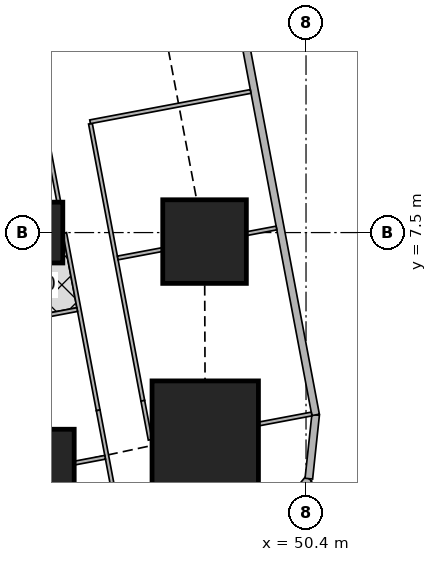
"""IFC4 building model, lengths in metres.
Left out: names, types, materials, properties, quantities, classifications, styles, units other than length and angle.
Written with IfcOpenShell. Run it as: python <this file> out.ifc"""

import sys

from ifc_helpers import new_model, si_unit, direction, frame, frame_2d, origin, origin_2d, place, context, subcontext, project, spatial, rectangle, extrude, element, fill, save


model = new_model("IFC4")
c1 = context("Model", 3, precision=1e-05, world=origin(), true_north=direction((0.0, 1.0)))
c2 = subcontext(c1, "Body", "Model", "MODEL_VIEW")
j1 = project(units=[si_unit("LENGTHUNIT", "METRE"), si_unit("PLANEANGLEUNIT", "RADIAN")], contexts=[c1])
p1 = place(None, origin())
s1 = spatial("IfcSite", under=j1, at=p1, CompositionType="ELEMENT")
p2 = place(p1, origin())
s2 = spatial("IfcBuilding", under=s1, at=p2, CompositionType="ELEMENT")
p3 = place(p2, frame((0.0, 0.0, 100.4)))
s3 = spatial("IfcBuildingStorey", under=s2, at=p3, CompositionType="ELEMENT", Elevation=100.4)
p4 = place(p3, frame((43.2, 1.225, 0.0), z_axis=(0.0, 0.0, 1.0), x_axis=(1.0, 0.0, 0.0)))
e1 = element("IfcColumn", 1, at=p4, inside=s3, PredefinedType="COLUMN", context=c2, shape_type="SweptSolid", body=[
    extrude(rectangle(XDim=2.2, YDim=2.2, at=origin_2d()), origin(), (0.0, 0.0, 1.0), 3.75),
])
p5 = place(p3, frame((47.748, 2.197, 0.0), z_axis=(0.0, 0.0, 1.0), x_axis=(1.0, 0.0, 0.0)))
e2 = element("IfcColumn", 2, at=p5, inside=s3, PredefinedType="COLUMN", context=c2, shape_type="SweptSolid", body=[
    extrude(rectangle(XDim=2.8, YDim=2.8, at=origin_2d()), origin(), (0.0, 0.0, 1.0), 3.75),
])
p6 = place(p3, frame((43.2, 7.5, 0.0), z_axis=(0.0, 0.0, 1.0), x_axis=(1.0, 0.0, 0.0)))
e3 = element("IfcColumn", 3, at=p6, inside=s3, PredefinedType="COLUMN", context=c2, shape_type="SweptSolid", body=[
    extrude(rectangle(XDim=1.6, YDim=1.6, at=origin_2d()), origin(), (0.0, 0.0, 1.0), 3.75),
])
p7 = place(p3, frame((47.73, 7.263, 0.0), z_axis=(0.0, 0.0, 1.0), x_axis=(1.0, 0.0, 0.0)))
e4 = element("IfcColumn", 4, at=p7, inside=s3, PredefinedType="COLUMN", context=c2, shape_type="SweptSolid", body=[
    extrude(rectangle(XDim=2.2, YDim=2.2, at=origin_2d()), origin(), (0.0, 0.0, 1.0), 3.75),
])
p8 = place(p3, frame((49.407, -0.263, 0.0), z_axis=(0.0, 0.0, 1.0), x_axis=(0.638042593423, 0.770001070764, 0.0)))
e5 = element("IfcWall", 5, at=p8, inside=s3, PredefinedType="SOLIDWALL", context=c2, shape_type="SweptSolid", body=[
    extrude(rectangle(XDim=1.673, YDim=0.2, at=frame_2d((0.836, 0.0))), origin(), (0.0, 0.0, 1.0), 3.5),
])
p9 = place(p3, frame((50.474, 1.025, 0.0), z_axis=(0.0, 0.0, 1.0), x_axis=(0.106047815515, 0.994361031429, 0.0)))
e6 = element("IfcWall", 6, at=p9, inside=s3, PredefinedType="SOLIDWALL", context=c2, shape_type="SweptSolid", body=[
    extrude(rectangle(XDim=1.688, YDim=0.2, at=frame_2d((0.844, 0.0))), origin(), (0.0, 0.0, 1.0), 3.5),
])
p10 = place(p3, frame((50.653, 2.703, 0.0), z_axis=(0.0, 0.0, 1.0), x_axis=(-0.185612026696, 0.982623109613, 0.0)))
e7 = element("IfcWall", 7, at=p10, inside=s3, PredefinedType="SOLIDWALL", context=c2, shape_type="SweptSolid", body=[
    extrude(rectangle(XDim=41.393, YDim=0.2, at=frame_2d((20.697, 0.0))), origin(), (0.0, 0.0, 1.0), 3.5),
])
p11 = place(p10, frame((1.633, 0.0, 0.9)))
e8 = element("IfcOpeningElement", 8, at=p11, cuts=e7, PredefinedType="OPENING", context=c2, shape_type="SweptSolid", body=[
    extrude(rectangle(XDim=1.8, YDim=1.5, at=frame_2d((0.9, 0.75))), frame((0.0, 0.11, 0.0), z_axis=(0.0, -1.0, 0.0), x_axis=(1.0, 0.0, 0.0)), (0.0, 0.0, 1.0), 0.22),
])
p12 = place(p10, frame((6.032, 0.0, 0.9)))
e9 = element("IfcOpeningElement", 9, at=p12, cuts=e7, PredefinedType="OPENING", context=c2, shape_type="SweptSolid", body=[
    extrude(rectangle(XDim=1.8, YDim=1.5, at=frame_2d((0.9, 0.75))), frame((0.0, 0.11, 0.0), z_axis=(0.0, -1.0, 0.0), x_axis=(1.0, 0.0, 0.0)), (0.0, 0.0, 1.0), 0.22),
])
p13 = place(p10, frame((9.848, 0.0, 0.9)))
e10 = element("IfcOpeningElement", 10, at=p13, cuts=e7, PredefinedType="OPENING", context=c2, shape_type="SweptSolid", body=[
    extrude(rectangle(XDim=1.8, YDim=1.5, at=frame_2d((0.9, 0.75))), frame((0.0, 0.11, 0.0), z_axis=(0.0, -1.0, 0.0), x_axis=(1.0, 0.0, 0.0)), (0.0, 0.0, 1.0), 0.22),
])
p14 = place(p10, frame((13.664, 0.0, 0.9)))
e11 = element("IfcOpeningElement", 11, at=p14, cuts=e7, PredefinedType="OPENING", context=c2, shape_type="SweptSolid", body=[
    extrude(rectangle(XDim=1.8, YDim=1.5, at=frame_2d((0.9, 0.75))), frame((0.0, 0.11, 0.0), z_axis=(0.0, -1.0, 0.0), x_axis=(1.0, 0.0, 0.0)), (0.0, 0.0, 1.0), 0.22),
])
p15 = place(p10, frame((17.481, 0.0, 0.9)))
e12 = element("IfcOpeningElement", 12, at=p15, cuts=e7, PredefinedType="OPENING", context=c2, shape_type="SweptSolid", body=[
    extrude(rectangle(XDim=1.8, YDim=1.5, at=frame_2d((0.9, 0.75))), frame((0.0, 0.11, 0.0), z_axis=(0.0, -1.0, 0.0), x_axis=(1.0, 0.0, 0.0)), (0.0, 0.0, 1.0), 0.22),
])
p16 = place(p10, frame((21.297, 0.0, 0.9)))
e13 = element("IfcOpeningElement", 13, at=p16, cuts=e7, PredefinedType="OPENING", context=c2, shape_type="SweptSolid", body=[
    extrude(rectangle(XDim=1.8, YDim=1.5, at=frame_2d((0.9, 0.75))), frame((0.0, 0.11, 0.0), z_axis=(0.0, -1.0, 0.0), x_axis=(1.0, 0.0, 0.0)), (0.0, 0.0, 1.0), 0.22),
])
p17 = place(p10, frame((25.113, 0.0, 0.9)))
e14 = element("IfcOpeningElement", 14, at=p17, cuts=e7, PredefinedType="OPENING", context=c2, shape_type="SweptSolid", body=[
    extrude(rectangle(XDim=1.8, YDim=1.5, at=frame_2d((0.9, 0.75))), frame((0.0, 0.11, 0.0), z_axis=(0.0, -1.0, 0.0), x_axis=(1.0, 0.0, 0.0)), (0.0, 0.0, 1.0), 0.22),
])
p18 = place(p10, frame((28.93, 0.0, 0.9)))
e15 = element("IfcOpeningElement", 15, at=p18, cuts=e7, PredefinedType="OPENING", context=c2, shape_type="SweptSolid", body=[
    extrude(rectangle(XDim=1.8, YDim=1.5, at=frame_2d((0.9, 0.75))), frame((0.0, 0.11, 0.0), z_axis=(0.0, -1.0, 0.0), x_axis=(1.0, 0.0, 0.0)), (0.0, 0.0, 1.0), 0.22),
])
p19 = place(p10, frame((32.746, 0.0, 0.9)))
e16 = element("IfcOpeningElement", 16, at=p19, cuts=e7, PredefinedType="OPENING", context=c2, shape_type="SweptSolid", body=[
    extrude(rectangle(XDim=1.8, YDim=1.5, at=frame_2d((0.9, 0.75))), frame((0.0, 0.11, 0.0), z_axis=(0.0, -1.0, 0.0), x_axis=(1.0, 0.0, 0.0)), (0.0, 0.0, 1.0), 0.22),
])
p20 = place(p10, frame((36.481, 0.0, 0.9)))
e17 = element("IfcOpeningElement", 17, at=p20, cuts=e7, PredefinedType="OPENING", context=c2, shape_type="SweptSolid", body=[
    extrude(rectangle(XDim=1.8, YDim=1.5, at=frame_2d((0.9, 0.75))), frame((0.0, 0.11, 0.0), z_axis=(0.0, -1.0, 0.0), x_axis=(1.0, 0.0, 0.0)), (0.0, 0.0, 1.0), 0.22),
])
p21 = place(p3, frame((44.727, 10.366, 0.0), z_axis=(0.0, 0.0, 1.0), x_axis=(0.185678775129, -0.982610498858, 0.0)))
e18 = element("IfcWall", 18, at=p21, inside=s3, PredefinedType="PARTITIONING", context=c2, shape_type="SweptSolid", body=[
    extrude(rectangle(XDim=7.421, YDim=0.1, at=frame_2d((3.71, 0.0))), origin(), (0.0, 0.0, 1.0), 3.5),
])
p22 = place(p21, frame((0.151, 0.0, 0.0)))
e19 = element("IfcOpeningElement", 19, at=p22, cuts=e18, PredefinedType="OPENING", context=c2, shape_type="SweptSolid", body=[
    extrude(rectangle(XDim=0.9, YDim=2.1, at=frame_2d((0.45, 1.05))), frame((0.0, 0.06, 0.0), z_axis=(0.0, -1.0, 0.0), x_axis=(1.0, 0.0, 0.0)), (0.0, 0.0, 1.0), 0.12),
])
p23 = place(p21, frame((4.55, 0.0, 0.0)))
e20 = element("IfcOpeningElement", 20, at=p23, cuts=e18, PredefinedType="OPENING", context=c2, shape_type="SweptSolid", body=[
    extrude(rectangle(XDim=0.9, YDim=2.1, at=frame_2d((0.45, 1.05))), frame((0.0, 0.06, 0.0), z_axis=(0.0, -1.0, 0.0), x_axis=(1.0, 0.0, 0.0)), (0.0, 0.0, 1.0), 0.12),
])
p24 = place(p3, frame((46.105, 3.074, 0.0), z_axis=(0.0, 0.0, 1.0), x_axis=(0.185897769544, -0.982569091351, 0.0)))
e21 = element("IfcWall", 21, at=p24, inside=s3, PredefinedType="PARTITIONING", context=c2, shape_type="SweptSolid", body=[
    extrude(rectangle(XDim=1.044, YDim=0.1, at=frame_2d((0.522, 0.0))), origin(), (0.0, 0.0, 1.0), 2.05),
])
p25 = place(p3, frame((43.539, 10.192, 0.0), z_axis=(0.0, 0.0, 1.0), x_axis=(0.185366049966, -0.982669541362, 0.0)))
e22 = element("IfcWall", 22, at=p25, inside=s3, PredefinedType="PARTITIONING", context=c2, shape_type="SweptSolid", body=[
    extrude(rectangle(XDim=1.915, YDim=0.1, at=frame_2d((0.958, 0.0))), origin(), (0.0, 0.0, 1.0), 3.5),
])
p26 = place(p3, frame((44.049, 7.49, 0.0), z_axis=(0.0, 0.0, 1.0), x_axis=(0.185666332607, -0.982612849975, 0.0)))
e23 = element("IfcWall", 23, at=p26, inside=s3, PredefinedType="PARTITIONING", context=c2, shape_type="SweptSolid", body=[
    extrude(rectangle(XDim=4.75, YDim=0.1, at=frame_2d((2.375, 0.0))), origin(), (0.0, 0.0, 1.0), 3.5),
])
p27 = place(p26, frame((0.8, 0.0, 0.0)))
e24 = element("IfcOpeningElement", 24, at=p27, cuts=e23, PredefinedType="OPENING", context=c2, shape_type="SweptSolid", body=[
    extrude(rectangle(XDim=0.9, YDim=2.1, at=frame_2d((0.45, 1.05))), frame((0.0, 0.06, 0.0), z_axis=(0.0, -1.0, 0.0), x_axis=(1.0, 0.0, 0.0)), (0.0, 0.0, 1.0), 0.12),
])
p28 = place(p26, frame((2.396, 0.0, 0.0)))
e25 = element("IfcOpeningElement", 25, at=p28, cuts=e23, PredefinedType="OPENING", context=c2, shape_type="SweptSolid", body=[
    extrude(rectangle(XDim=0.9, YDim=2.1, at=frame_2d((0.45, 1.05))), frame((0.0, 0.06, 0.0), z_axis=(0.0, -1.0, 0.0), x_axis=(1.0, 0.0, 0.0)), (0.0, 0.0, 1.0), 0.12),
])
p29 = place(p3, frame((44.931, 2.823, 0.0), z_axis=(0.0, 0.0, 1.0), x_axis=(0.185631845838, -0.982619365681, 0.0)))
e26 = element("IfcWall", 26, at=p29, inside=s3, PredefinedType="PARTITIONING", context=c2, shape_type="SweptSolid", body=[
    extrude(rectangle(XDim=2.403, YDim=0.1, at=frame_2d((1.201, 0.0))), origin(), (0.0, 0.0, 1.0), 2.05),
])
p30 = place(p3, frame((48.943, 11.213, 0.0), z_axis=(0.0, 0.0, 1.0), x_axis=(-0.982633535512, -0.185556823879, 0.0)))
e27 = element("IfcWall", 27, at=p30, inside=s3, PredefinedType="PARTITIONING", context=c2, shape_type="SweptSolid", body=[
    extrude(rectangle(XDim=4.3, YDim=0.1, at=frame_2d((2.15, 0.0))), origin(), (0.0, 0.0, 1.0), 2.2),
])
p31 = place(p3, frame((49.622, 7.62, 0.0), z_axis=(0.0, 0.0, 1.0), x_axis=(-0.982512656401, -0.186195810938, 0.0)))
e28 = element("IfcWall", 28, at=p31, inside=s3, PredefinedType="PARTITIONING", context=c2, shape_type="SweptSolid", body=[
    extrude(rectangle(XDim=0.796, YDim=0.1, at=frame_2d((0.398, 0.0))), origin(), (0.0, 0.0, 1.0), 2.05),
])
p32 = place(p3, frame((46.62, 7.053, 0.0), z_axis=(0.0, 0.0, 1.0), x_axis=(-0.982749355621, -0.18494243436, 0.0)))
e29 = element("IfcWall", 29, at=p32, inside=s3, PredefinedType="PARTITIONING", context=c2, shape_type="SweptSolid", body=[
    extrude(rectangle(XDim=1.195, YDim=0.1, at=frame_2d((0.597, 0.0))), origin(), (0.0, 0.0, 1.0), 2.05),
])
p33 = place(p3, frame((50.547, 2.726, 0.0), z_axis=(0.0, 0.0, 1.0), x_axis=(-0.982680053146, -0.185310315822, 0.0)))
e30 = element("IfcWall", 30, at=p33, inside=s3, PredefinedType="PARTITIONING", context=c2, shape_type="SweptSolid", body=[
    extrude(rectangle(XDim=1.414, YDim=0.1, at=frame_2d((0.707, 0.0))), origin(), (0.0, 0.0, 1.0), 3.5),
])
p34 = place(p3, frame((45.114, 1.587, 0.0), z_axis=(0.0, 0.0, 1.0), x_axis=(-0.982624706348, -0.185603573443, 0.0)))
e31 = element("IfcWall", 31, at=p34, inside=s3, PredefinedType="PARTITIONING", context=c2, shape_type="SweptSolid", body=[
    extrude(rectangle(XDim=0.818, YDim=0.1, at=frame_2d((0.409, 0.0))), origin(), (0.0, 0.0, 1.0), 2.05),
])
p35 = place(p3, frame((44.379, 5.474, 0.0), z_axis=(0.0, 0.0, 1.0), x_axis=(-0.982607026909, -0.185697147715, 0.0)))
e32 = element("IfcWall", 32, at=p35, inside=s3, PredefinedType="PARTITIONING", context=c2, shape_type="SweptSolid", body=[
    extrude(rectangle(XDim=3.275, YDim=0.1, at=frame_2d((1.637, 0.0))), origin(), (0.0, 0.0, 1.0), 3.5),
])
p36 = place(p11, origin())
e33 = element("IfcWindow", 33, at=p36, inside=s3, PartitioningType="SINGLE_PANEL", PredefinedType="WINDOW", context=c2, shape_type="SweptSolid", body=[
    extrude(rectangle(XDim=1.8, YDim=1.5, at=frame_2d((0.9, 0.75))), frame((0.0, 0.03, 0.0), z_axis=(0.0, -1.0, 0.0), x_axis=(1.0, 0.0, 0.0)), (0.0, 0.0, 1.0), 0.06),
])
fill(e8, e33)
p37 = place(p12, origin())
e34 = element("IfcWindow", 34, at=p37, inside=s3, PartitioningType="SINGLE_PANEL", PredefinedType="WINDOW", context=c2, shape_type="SweptSolid", body=[
    extrude(rectangle(XDim=1.8, YDim=1.5, at=frame_2d((0.9, 0.75))), frame((0.0, 0.03, 0.0), z_axis=(0.0, -1.0, 0.0), x_axis=(1.0, 0.0, 0.0)), (0.0, 0.0, 1.0), 0.06),
])
fill(e9, e34)
p38 = place(p22, origin())
e35 = element("IfcDoor", 35, at=p38, inside=s3, OperationType="SINGLE_SWING_LEFT", PredefinedType="DOOR", context=c2, shape_type="SweptSolid", body=[
    extrude(rectangle(XDim=0.9, YDim=2.1, at=frame_2d((0.45, 1.05))), frame((0.0, 0.025, 0.0), z_axis=(0.0, -1.0, 0.0), x_axis=(1.0, 0.0, 0.0)), (0.0, 0.0, 1.0), 0.05),
])
fill(e19, e35)
p39 = place(p23, origin())
e36 = element("IfcDoor", 36, at=p39, inside=s3, OperationType="SINGLE_SWING_LEFT", PredefinedType="DOOR", context=c2, shape_type="SweptSolid", body=[
    extrude(rectangle(XDim=0.9, YDim=2.1, at=frame_2d((0.45, 1.05))), frame((0.0, 0.025, 0.0), z_axis=(0.0, -1.0, 0.0), x_axis=(1.0, 0.0, 0.0)), (0.0, 0.0, 1.0), 0.05),
])
fill(e20, e36)
p40 = place(p27, origin())
e37 = element("IfcDoor", 37, at=p40, inside=s3, OperationType="SINGLE_SWING_LEFT", PredefinedType="DOOR", context=c2, shape_type="SweptSolid", body=[
    extrude(rectangle(XDim=0.9, YDim=2.1, at=frame_2d((0.45, 1.05))), frame((0.0, 0.025, 0.0), z_axis=(0.0, -1.0, 0.0), x_axis=(1.0, 0.0, 0.0)), (0.0, 0.0, 1.0), 0.05),
])
fill(e24, e37)
p41 = place(p28, origin())
e38 = element("IfcDoor", 38, at=p41, inside=s3, OperationType="SINGLE_SWING_RIGHT", PredefinedType="DOOR", context=c2, shape_type="SweptSolid", body=[
    extrude(rectangle(XDim=0.9, YDim=2.1, at=frame_2d((0.45, 1.05))), frame((0.0, 0.025, 0.0), z_axis=(0.0, -1.0, 0.0), x_axis=(1.0, 0.0, 0.0)), (0.0, 0.0, 1.0), 0.05),
])
fill(e25, e38)
save(model, sys.argv[1])
